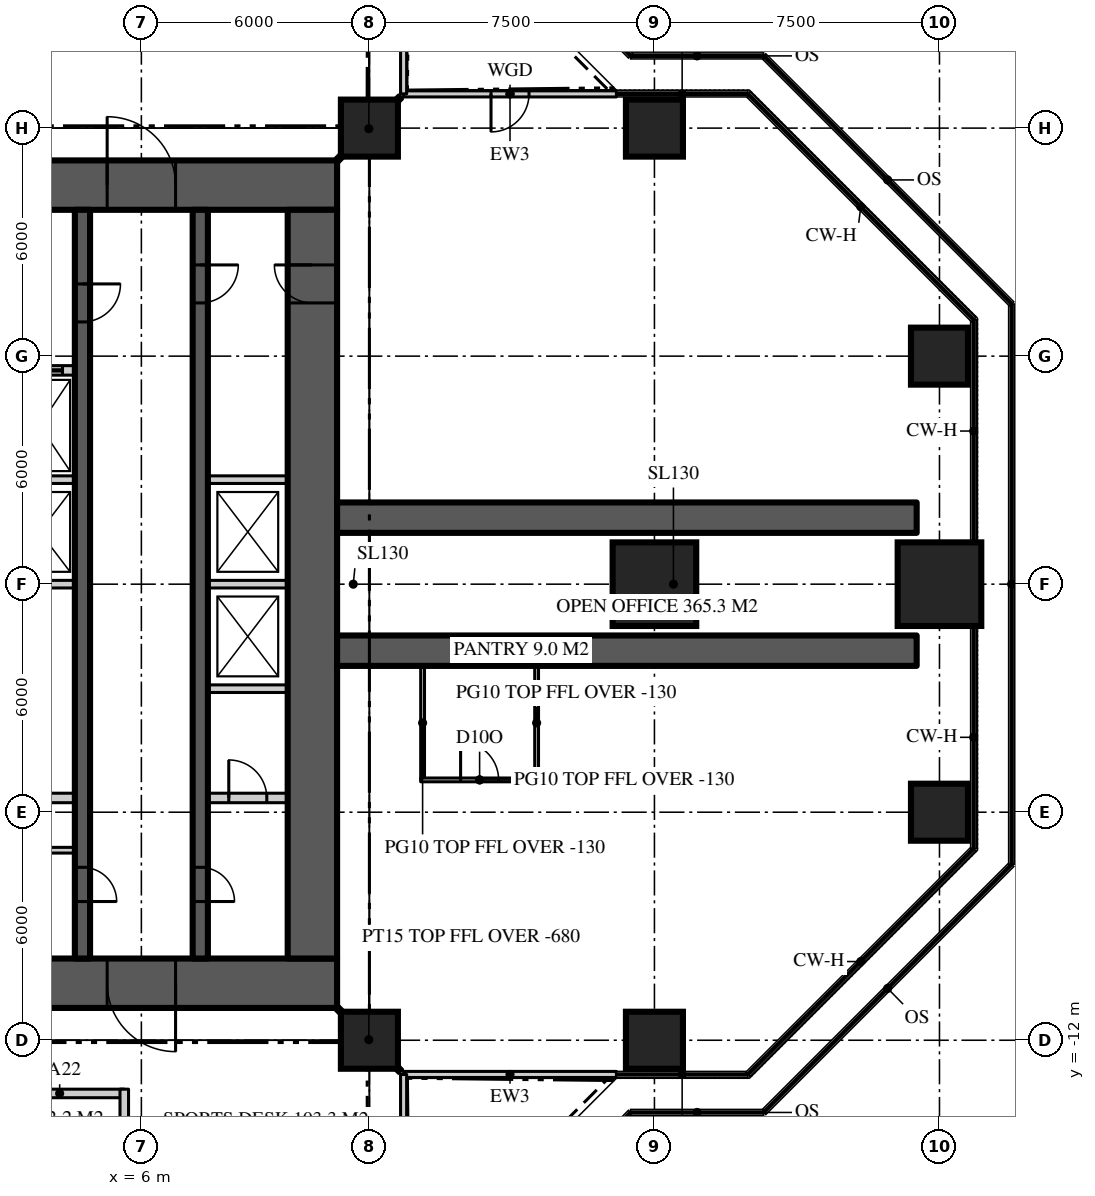
"""IFC4 building model, lengths in metres.
Left out: names, types, materials, properties, quantities, classifications, styles, units other than length and angle.
Written with IfcOpenShell. Run it as: python <this file> out.ifc"""

import sys

from ifc_helpers import new_model, si_unit, direction, frame, frame_2d, origin, origin_2d, place, context, subcontext, project, spatial, rectangle, extrude, element, fill, save


model = new_model("IFC4")
c1 = context("Model", 3, precision=1e-05, world=origin(), true_north=direction((0.0, 1.0)))
c2 = subcontext(c1, "Body", "Model", "MODEL_VIEW")
j1 = project(units=[si_unit("LENGTHUNIT", "METRE"), si_unit("PLANEANGLEUNIT", "RADIAN")], contexts=[c1])
p1 = place(None, origin())
s1 = spatial("IfcSite", under=j1, at=p1, CompositionType="ELEMENT")
p2 = place(p1, origin())
s2 = spatial("IfcBuilding", under=s1, at=p2, CompositionType="ELEMENT")
p3 = place(p2, frame((0.0, 0.0, 216.6)))
s3 = spatial("IfcBuildingStorey", under=s2, at=p3, CompositionType="ELEMENT", Elevation=216.6)
p4 = place(p3, frame((-11.15, 10.5, 0.0), z_axis=(0.0, 0.0, 1.0), x_axis=(1.0, 0.0, 0.0)))
e1 = element("IfcWall", 1, at=p4, inside=s3, PredefinedType="SHEAR", context=c2, shape_type="SweptSolid", body=[
    extrude(rectangle(XDim=22.3, YDim=1.3, at=frame_2d((11.15, 0.0))), origin(), (0.0, 0.0, 1.0), 3.9),
])
p5 = place(p4, frame((4.25, 0.0, 0.0)))
e2 = element("IfcOpeningElement", 2, at=p5, cuts=e1, PredefinedType="OPENING", context=c2, shape_type="SweptSolid", body=[
    extrude(rectangle(XDim=1.8, YDim=2.2, at=frame_2d((0.9, 1.1))), frame((0.0, 0.66, 0.0), z_axis=(0.0, -1.0, 0.0), x_axis=(1.0, 0.0, 0.0)), (0.0, 0.0, 1.0), 1.32),
])
p6 = place(p4, frame((16.25, 0.0, 0.0)))
e3 = element("IfcOpeningElement", 3, at=p6, cuts=e1, PredefinedType="OPENING", context=c2, shape_type="SweptSolid", body=[
    extrude(rectangle(XDim=1.8, YDim=2.2, at=frame_2d((0.9, 1.1))), frame((0.0, 0.66, 0.0), z_axis=(0.0, -1.0, 0.0), x_axis=(1.0, 0.0, 0.0)), (0.0, 0.0, 1.0), 1.32),
])
p7 = place(p3, frame((11.15, -10.5, 0.0), z_axis=(0.0, 0.0, 1.0), x_axis=(-1.0, 0.0, 0.0)))
e4 = element("IfcWall", 4, at=p7, inside=s3, PredefinedType="SHEAR", context=c2, shape_type="SweptSolid", body=[
    extrude(rectangle(XDim=22.3, YDim=1.3, at=frame_2d((11.15, 0.0))), origin(), (0.0, 0.0, 1.0), 3.9),
])
p8 = place(p7, frame((16.25, 0.0, 0.0)))
e5 = element("IfcOpeningElement", 5, at=p8, cuts=e4, PredefinedType="OPENING", context=c2, shape_type="SweptSolid", body=[
    extrude(rectangle(XDim=1.8, YDim=2.2, at=frame_2d((0.9, 1.1))), frame((0.0, 0.66, 0.0), z_axis=(0.0, -1.0, 0.0), x_axis=(1.0, 0.0, 0.0)), (0.0, 0.0, 1.0), 1.32),
])
p9 = place(p7, frame((4.25, 0.0, 0.0)))
e6 = element("IfcOpeningElement", 6, at=p9, cuts=e4, PredefinedType="OPENING", context=c2, shape_type="SweptSolid", body=[
    extrude(rectangle(XDim=1.8, YDim=2.2, at=frame_2d((0.9, 1.1))), frame((0.0, 0.66, 0.0), z_axis=(0.0, -1.0, 0.0), x_axis=(1.0, 0.0, 0.0)), (0.0, 0.0, 1.0), 1.32),
])
p10 = place(p3, frame((10.5, -9.85, 0.0), z_axis=(0.0, 0.0, 1.0), x_axis=(0.0, 1.0, 0.0)))
e7 = element("IfcWall", 7, at=p10, inside=s3, PredefinedType="SHEAR", context=c2, shape_type="SweptSolid", body=[
    extrude(rectangle(XDim=19.7, YDim=1.3, at=frame_2d((9.85, 0.0))), origin(), (0.0, 0.0, 1.0), 3.9),
])
p11 = place(p10, frame((17.25, 0.0, 0.0)))
e8 = element("IfcOpeningElement", 8, at=p11, cuts=e7, PredefinedType="OPENING", context=c2, shape_type="SweptSolid", body=[
    extrude(rectangle(XDim=1.0, YDim=2.2, at=frame_2d((0.5, 1.1))), frame((0.0, 0.66, 0.0), z_axis=(0.0, -1.0, 0.0), x_axis=(1.0, 0.0, 0.0)), (0.0, 0.0, 1.0), 1.32),
])
for number, where, z_axis, x_axis in (
    (9, (11.15, -1.75, 0.0), (0.0, 0.0, 1.0), (1.0, 0.0, 0.0)),
    (10, (11.15, 1.75, 0.0), (0.0, 0.0, 1.0), (1.0, 0.0, 0.0)),
):
    element("IfcWall", number, at=place(p3, frame(where, z_axis=z_axis, x_axis=x_axis)), inside=s3, PredefinedType="SHEAR", context=c2, shape_type="SweptSolid", body=[
        extrude(rectangle(XDim=15.25, YDim=0.8, at=frame_2d((7.625, 0.0))), origin(), (0.0, 0.0, 1.0), 3.9),
    ])
for number, where, z_axis, x_axis in (
    (11, (12.0, -12.0, 0.0), (0.0, 0.0, 1.0), (1.0, 0.0, 0.0)),
    (12, (19.5, -12.0, 0.0), (0.0, 0.0, 1.0), (1.0, 0.0, 0.0)),
    (13, (27.0, -6.0, 0.0), (0.0, 0.0, 1.0), (1.0, 0.0, 0.0)),
):
    element("IfcColumn", number, at=place(p3, frame(where, z_axis=z_axis, x_axis=x_axis)), inside=s3, PredefinedType="COLUMN", context=c2, shape_type="SweptSolid", body=[
        extrude(rectangle(XDim=1.5, YDim=1.5, at=origin_2d()), origin(), (0.0, 0.0, 1.0), 3.9),
    ])
for number, where, z_axis, x_axis in (
    (14, (19.5, 0.0, 0.0), (0.0, 0.0, 1.0), (1.0, 0.0, 0.0)),
    (15, (27.0, 0.0, 0.0), (0.0, 0.0, 1.0), (1.0, 0.0, 0.0)),
):
    element("IfcColumn", number, at=place(p3, frame(where, z_axis=z_axis, x_axis=x_axis)), inside=s3, PredefinedType="COLUMN", context=c2, shape_type="SweptSolid", body=[
        extrude(rectangle(XDim=2.2, YDim=2.2, at=origin_2d()), origin(), (0.0, 0.0, 1.0), 3.9),
    ])
for number, where, z_axis, x_axis in (
    (16, (27.0, 6.0, 0.0), (0.0, 0.0, 1.0), (1.0, 0.0, 0.0)),
    (17, (12.0, 12.0, 0.0), (0.0, 0.0, 1.0), (1.0, 0.0, 0.0)),
    (18, (19.5, 12.0, 0.0), (0.0, 0.0, 1.0), (1.0, 0.0, 0.0)),
):
    element("IfcColumn", number, at=place(p3, frame(where, z_axis=z_axis, x_axis=x_axis)), inside=s3, PredefinedType="COLUMN", context=c2, shape_type="SweptSolid", body=[
        extrude(rectangle(XDim=1.5, YDim=1.5, at=origin_2d()), origin(), (0.0, 0.0, 1.0), 3.9),
    ])
p12 = place(p3, frame((12.9, -12.9, 0.0), z_axis=(0.0, 0.0, 1.0), x_axis=(1.0, 0.0, 0.0)))
e19 = element("IfcWall", 19, at=p12, inside=s3, PredefinedType="SOLIDWALL", context=c2, shape_type="SweptSolid", body=[
    extrude(rectangle(XDim=5.6, YDim=0.16, at=frame_2d((2.8, 0.0))), origin(), (0.0, 0.0, 1.0), 3.77),
])
p13 = place(p3, frame((18.5, 12.9, 0.0), z_axis=(0.0, 0.0, 1.0), x_axis=(-1.0, 0.0, 0.0)))
e20 = element("IfcWall", 20, at=p13, inside=s3, PredefinedType="SOLIDWALL", context=c2, shape_type="SweptSolid", body=[
    extrude(rectangle(XDim=5.6, YDim=0.16, at=frame_2d((2.8, 0.0))), origin(), (0.0, 0.0, 1.0), 3.77),
])
p14 = place(p13, frame((2.3, 0.0, 0.0)))
e21 = element("IfcOpeningElement", 21, at=p14, cuts=e20, PredefinedType="OPENING", context=c2, shape_type="SweptSolid", body=[
    extrude(rectangle(XDim=1.0, YDim=2.2, at=frame_2d((0.5, 1.1))), frame((0.0, 0.09, 0.0), z_axis=(0.0, -1.0, 0.0), x_axis=(1.0, 0.0, 0.0)), (0.0, 0.0, 1.0), 0.18),
])
p15 = place(p3, frame((12.9, 12.9, 0.0), z_axis=(0.0, 0.0, 1.0), x_axis=(0.0, 1.0, 0.0)))
e22 = element("IfcWall", 22, at=p15, inside=s3, PredefinedType="SOLIDWALL", context=c2, shape_type="SweptSolid", body=[
    extrude(rectangle(XDim=5.6, YDim=0.16, at=frame_2d((2.8, 0.0))), origin(), (0.0, 0.0, 1.0), 3.77),
])
p16 = place(p3, frame((12.9, -18.5, 0.0), z_axis=(0.0, 0.0, 1.0), x_axis=(0.0, 1.0, 0.0)))
e23 = element("IfcWall", 23, at=p16, inside=s3, PredefinedType="SOLIDWALL", context=c2, shape_type="SweptSolid", body=[
    extrude(rectangle(XDim=5.6, YDim=0.16, at=frame_2d((2.8, 0.0))), origin(), (0.0, 0.0, 1.0), 3.77),
])
p17 = place(p16, frame((2.3, 0.0, 0.0)))
e24 = element("IfcOpeningElement", 24, at=p17, cuts=e23, PredefinedType="OPENING", context=c2, shape_type="SweptSolid", body=[
    extrude(rectangle(XDim=1.0, YDim=2.2, at=frame_2d((0.5, 1.1))), frame((0.0, 0.09, 0.0), z_axis=(0.0, -1.0, 0.0), x_axis=(1.0, 0.0, 0.0)), (0.0, 0.0, 1.0), 0.18),
])
p18 = place(p3, frame((7.55, 9.85, 0.0), z_axis=(0.0, 0.0, 1.0), x_axis=(0.0, -1.0, 0.0)))
e25 = element("IfcWall", 25, at=p18, inside=s3, PredefinedType="SHEAR", context=c2, shape_type="SweptSolid", body=[
    extrude(rectangle(XDim=19.7, YDim=0.4, at=frame_2d((9.85, 0.0))), origin(), (0.0, 0.0, 1.0), 3.9),
])
p19 = place(p18, frame((1.45, 0.0, 0.0)))
e26 = element("IfcOpeningElement", 26, at=p19, cuts=e25, PredefinedType="OPENING", context=c2, shape_type="SweptSolid", body=[
    extrude(rectangle(XDim=1.0, YDim=2.2, at=frame_2d((0.5, 1.1))), frame((0.0, 0.21, 0.0), z_axis=(0.0, -1.0, 0.0), x_axis=(1.0, 0.0, 0.0)), (0.0, 0.0, 1.0), 0.42),
])
p20 = place(p18, frame((17.3, 0.0, 0.0)))
e27 = element("IfcOpeningElement", 27, at=p20, cuts=e25, PredefinedType="OPENING", context=c2, shape_type="SweptSolid", body=[
    extrude(rectangle(XDim=0.9, YDim=2.1, at=frame_2d((0.45, 1.05))), frame((0.0, 0.21, 0.0), z_axis=(0.0, -1.0, 0.0), x_axis=(1.0, 0.0, 0.0)), (0.0, 0.0, 1.0), 0.42),
])
p21 = place(p3, frame((4.45, 9.85, 0.0), z_axis=(0.0, 0.0, 1.0), x_axis=(0.0, -1.0, 0.0)))
e28 = element("IfcWall", 28, at=p21, inside=s3, PredefinedType="SHEAR", context=c2, shape_type="SweptSolid", body=[
    extrude(rectangle(XDim=19.7, YDim=0.4, at=frame_2d((9.85, 0.0))), origin(), (0.0, 0.0, 1.0), 3.9),
])
p22 = place(p21, frame((1.95, 0.0, 0.0)))
e29 = element("IfcOpeningElement", 29, at=p22, cuts=e28, PredefinedType="OPENING", context=c2, shape_type="SweptSolid", body=[
    extrude(rectangle(XDim=1.0, YDim=2.2, at=frame_2d((0.5, 1.1))), frame((0.0, 0.21, 0.0), z_axis=(0.0, -1.0, 0.0), x_axis=(1.0, 0.0, 0.0)), (0.0, 0.0, 1.0), 0.42),
])
p23 = place(p21, frame((17.3, 0.0, 0.0)))
e30 = element("IfcOpeningElement", 30, at=p23, cuts=e28, PredefinedType="OPENING", context=c2, shape_type="SweptSolid", body=[
    extrude(rectangle(XDim=0.9, YDim=2.1, at=frame_2d((0.45, 1.05))), frame((0.0, 0.21, 0.0), z_axis=(0.0, -1.0, 0.0), x_axis=(1.0, 0.0, 0.0)), (0.0, 0.0, 1.0), 0.42),
])
p24 = place(p3, frame((2.4, 5.625, 0.0), z_axis=(0.0, 0.0, 1.0), x_axis=(1.0, 0.0, 0.0)))
e31 = element("IfcWall", 31, at=p24, inside=s3, PredefinedType="SOLIDWALL", context=c2, shape_type="SweptSolid", body=[
    extrude(rectangle(XDim=1.85, YDim=0.25, at=frame_2d((0.925, 0.0))), origin(), (0.0, 0.0, 1.0), 3.7),
])
p25 = place(p24, frame((0.325, 0.0, 0.0)))
e32 = element("IfcOpeningElement", 32, at=p25, cuts=e31, PredefinedType="OPENING", context=c2, shape_type="SweptSolid", body=[
    extrude(rectangle(XDim=1.2, YDim=2.2, at=frame_2d((0.6, 1.1))), frame((0.0, 0.135, 0.0), z_axis=(0.0, -1.0, 0.0), x_axis=(1.0, 0.0, 0.0)), (0.0, 0.0, 1.0), 0.27),
])
p26 = place(p3, frame((2.4, -5.625, 0.0), z_axis=(0.0, 0.0, 1.0), x_axis=(1.0, 0.0, 0.0)))
e33 = element("IfcWall", 33, at=p26, inside=s3, PredefinedType="SOLIDWALL", context=c2, shape_type="SweptSolid", body=[
    extrude(rectangle(XDim=1.85, YDim=0.25, at=frame_2d((0.925, 0.0))), origin(), (0.0, 0.0, 1.0), 3.7),
])
p27 = place(p3, frame((7.75, -5.625, 0.0), z_axis=(0.0, 0.0, 1.0), x_axis=(1.0, 0.0, 0.0)))
e34 = element("IfcWall", 34, at=p27, inside=s3, PredefinedType="SOLIDWALL", context=c2, shape_type="SweptSolid", body=[
    extrude(rectangle(XDim=2.1, YDim=0.25, at=frame_2d((1.05, 0.0))), origin(), (0.0, 0.0, 1.0), 3.7),
])
p28 = place(p27, frame((0.55, 0.0, 0.0)))
e35 = element("IfcOpeningElement", 35, at=p28, cuts=e34, PredefinedType="OPENING", context=c2, shape_type="SweptSolid", body=[
    extrude(rectangle(XDim=1.0, YDim=2.2, at=frame_2d((0.5, 1.1))), frame((0.0, 0.135, 0.0), z_axis=(0.0, -1.0, 0.0), x_axis=(1.0, 0.0, 0.0)), (0.0, 0.0, 1.0), 0.27),
])
p29 = place(p3, frame((7.75, -2.75, 0.0), z_axis=(0.0, 0.0, 1.0), x_axis=(1.0, 0.0, 0.0)))
e36 = element("IfcWall", 36, at=p29, inside=s3, PredefinedType="SOLIDWALL", context=c2, shape_type="SweptSolid", body=[
    extrude(rectangle(XDim=2.1, YDim=0.2, at=frame_2d((1.05, 0.0))), origin(), (0.0, 0.0, 1.0), 3.7),
])
p30 = place(p3, frame((2.4, 0.0, 0.0), z_axis=(0.0, 0.0, 1.0), x_axis=(1.0, 0.0, 0.0)))
e37 = element("IfcWall", 37, at=p30, inside=s3, PredefinedType="SOLIDWALL", context=c2, shape_type="SweptSolid", body=[
    extrude(rectangle(XDim=1.85, YDim=0.2, at=frame_2d((0.925, 0.0))), origin(), (0.0, 0.0, 1.0), 3.7),
])
p31 = place(p3, frame((7.75, 0.0, 0.0), z_axis=(0.0, 0.0, 1.0), x_axis=(1.0, 0.0, 0.0)))
e38 = element("IfcWall", 38, at=p31, inside=s3, PredefinedType="SOLIDWALL", context=c2, shape_type="SweptSolid", body=[
    extrude(rectangle(XDim=2.1, YDim=0.2, at=frame_2d((1.05, 0.0))), origin(), (0.0, 0.0, 1.0), 3.7),
])
p32 = place(p3, frame((2.4, 2.75, 0.0), z_axis=(0.0, 0.0, 1.0), x_axis=(1.0, 0.0, 0.0)))
e39 = element("IfcWall", 39, at=p32, inside=s3, PredefinedType="SOLIDWALL", context=c2, shape_type="SweptSolid", body=[
    extrude(rectangle(XDim=1.85, YDim=0.2, at=frame_2d((0.925, 0.0))), origin(), (0.0, 0.0, 1.0), 3.7),
])
p33 = place(p3, frame((7.75, 2.75, 0.0), z_axis=(0.0, 0.0, 1.0), x_axis=(1.0, 0.0, 0.0)))
e40 = element("IfcWall", 40, at=p33, inside=s3, PredefinedType="SOLIDWALL", context=c2, shape_type="SweptSolid", body=[
    extrude(rectangle(XDim=2.1, YDim=0.2, at=frame_2d((1.05, 0.0))), origin(), (0.0, 0.0, 1.0), 3.7),
])
for number, where, z_axis, x_axis in (
    (41, (13.4, -2.15, 0.0), (0.0, 0.0, 1.0), (0.0, -1.0, 0.0)),
    (42, (16.4, -2.15, 0.0), (0.0, 0.0, 1.0), (0.0, -1.0, 0.0)),
):
    element("IfcWall", number, at=place(p3, frame(where, z_axis=z_axis, x_axis=x_axis)), inside=s3, PredefinedType="PARTITIONING", context=c2, shape_type="SweptSolid", body=[
        extrude(rectangle(XDim=3.0, YDim=0.1, at=frame_2d((1.5, 0.0))), origin(), (0.0, 0.0, 1.0), 3.77),
    ])
p34 = place(p3, frame((13.35, -5.15, 0.0), z_axis=(0.0, 0.0, 1.0), x_axis=(1.0, 0.0, 0.0)))
e43 = element("IfcWall", 43, at=p34, inside=s3, PredefinedType="PARTITIONING", context=c2, shape_type="SweptSolid", body=[
    extrude(rectangle(XDim=3.1, YDim=0.1, at=frame_2d((1.55, 0.0))), origin(), (0.0, 0.0, 1.0), 3.77),
])
p35 = place(p34, frame((1.05, 0.0, 0.0)))
e44 = element("IfcOpeningElement", 44, at=p35, cuts=e43, PredefinedType="OPENING", context=c2, shape_type="SweptSolid", body=[
    extrude(rectangle(XDim=1.0, YDim=2.2, at=frame_2d((0.5, 1.1))), frame((0.0, 0.06, 0.0), z_axis=(0.0, -1.0, 0.0), x_axis=(1.0, 0.0, 0.0)), (0.0, 0.0, 1.0), 0.12),
])
p36 = place(p3, frame((2.15, -13.4, 0.0), z_axis=(0.0, 0.0, 1.0), x_axis=(1.0, 0.0, 0.0)))
e45 = element("IfcWall", 45, at=p36, inside=s3, PredefinedType="PARTITIONING", context=c2, shape_type="SweptSolid", body=[
    extrude(rectangle(XDim=3.4, YDim=0.225, at=frame_2d((1.7, 0.0))), origin(), (0.0, 0.0, 1.0), 3.77),
])
p37 = place(p3, frame((5.55, -13.288, 0.0), z_axis=(0.0, 0.0, 1.0), x_axis=(0.0, -1.0, 0.0)))
e46 = element("IfcWall", 46, at=p37, inside=s3, PredefinedType="PARTITIONING", context=c2, shape_type="SweptSolid", body=[
    extrude(rectangle(XDim=3.825, YDim=0.225, at=frame_2d((1.913, 0.0))), origin(), (0.0, 0.0, 1.0), 3.77),
])
p38 = place(p37, frame((1.312, 0.0, 0.0)))
e47 = element("IfcOpeningElement", 47, at=p38, cuts=e46, PredefinedType="OPENING", context=c2, shape_type="SweptSolid", body=[
    extrude(rectangle(XDim=1.2, YDim=2.2, at=frame_2d((0.6, 1.1))), frame((0.0, 0.123, 0.0), z_axis=(0.0, -1.0, 0.0), x_axis=(1.0, 0.0, 0.0)), (0.0, 0.0, 1.0), 0.245),
])
for number, where, z_axis, x_axis in (
    (48, (11.15, 11.15, 0.0), (0.0, 0.0, 1.0), (0.707, 0.707, 0.0)),
    (49, (11.15, -11.15, 0.0), (0.0, 0.0, 1.0), (0.707, -0.707, 0.0)),
):
    element("IfcWall", number, at=place(p3, frame(where, z_axis=z_axis, x_axis=x_axis)), inside=s3, PredefinedType="PARTITIONING", context=c2, shape_type="SweptSolid", body=[
        extrude(rectangle(XDim=2.362, YDim=0.15, at=frame_2d((1.181, 0.0))), origin(), (0.0, 0.0, 1.0), 3.22),
    ])
p39 = place(p3, frame((2.4, -7.0, 0.0), z_axis=(0.0, 0.0, 1.0), x_axis=(1.0, 0.0, 0.0)))
e50 = element("IfcWall", 50, at=p39, inside=s3, PredefinedType="SOLIDWALL", context=c2, shape_type="SweptSolid", body=[
    extrude(rectangle(XDim=1.85, YDim=0.15, at=frame_2d((0.925, 0.0))), origin(), (0.0, 0.0, 1.0), 3.77),
])
p40 = place(p39, frame((0.1, 0.0, 0.0)))
e51 = element("IfcOpeningElement", 51, at=p40, cuts=e50, PredefinedType="OPENING", context=c2, shape_type="SweptSolid", body=[
    extrude(rectangle(XDim=0.9, YDim=2.1, at=frame_2d((0.45, 1.05))), frame((0.0, 0.085, 0.0), z_axis=(0.0, -1.0, 0.0), x_axis=(1.0, 0.0, 0.0)), (0.0, 0.0, 1.0), 0.17),
])
p41 = place(p14, origin())
e52 = element("IfcDoor", 52, at=p41, inside=s3, OperationType="SINGLE_SWING_RIGHT", PredefinedType="DOOR", context=c2, shape_type="SweptSolid", body=[
    extrude(rectangle(XDim=1.0, YDim=2.2, at=frame_2d((0.5, 1.1))), frame((0.0, 0.025, 0.0), z_axis=(0.0, -1.0, 0.0), x_axis=(1.0, 0.0, 0.0)), (0.0, 0.0, 1.0), 0.05),
])
fill(e21, e52)
p42 = place(p6, origin())
e53 = element("IfcDoor", 53, at=p42, inside=s3, OperationType="DOUBLE_DOOR_DOUBLE_SWING", PredefinedType="DOOR", context=c2, shape_type="SweptSolid", body=[
    extrude(rectangle(XDim=1.8, YDim=2.2, at=frame_2d((0.9, 1.1))), frame((0.0, 0.025, 0.0), z_axis=(0.0, -1.0, 0.0), x_axis=(1.0, 0.0, 0.0)), (0.0, 0.0, 1.0), 0.05),
])
fill(e3, e53)
p43 = place(p9, origin())
e54 = element("IfcDoor", 54, at=p43, inside=s3, OperationType="DOUBLE_DOOR_DOUBLE_SWING", PredefinedType="DOOR", context=c2, shape_type="SweptSolid", body=[
    extrude(rectangle(XDim=1.8, YDim=2.2, at=frame_2d((0.9, 1.1))), frame((0.0, 0.025, 0.0), z_axis=(0.0, -1.0, 0.0), x_axis=(1.0, 0.0, 0.0)), (0.0, 0.0, 1.0), 0.05),
])
fill(e6, e54)
p44 = place(p19, origin())
e55 = element("IfcDoor", 55, at=p44, inside=s3, OperationType="SINGLE_SWING_LEFT", PredefinedType="DOOR", context=c2, shape_type="SweptSolid", body=[
    extrude(rectangle(XDim=1.0, YDim=2.2, at=frame_2d((0.5, 1.1))), frame((0.0, 0.025, 0.0), z_axis=(0.0, -1.0, 0.0), x_axis=(1.0, 0.0, 0.0)), (0.0, 0.0, 1.0), 0.05),
])
fill(e26, e55)
p45 = place(p11, origin())
e56 = element("IfcDoor", 56, at=p45, inside=s3, OperationType="SINGLE_SWING_RIGHT", PredefinedType="DOOR", context=c2, shape_type="SweptSolid", body=[
    extrude(rectangle(XDim=1.0, YDim=2.2, at=frame_2d((0.5, 1.1))), frame((0.0, 0.025, 0.0), z_axis=(0.0, -1.0, 0.0), x_axis=(1.0, 0.0, 0.0)), (0.0, 0.0, 1.0), 0.05),
])
fill(e8, e56)
p46 = place(p22, origin())
e57 = element("IfcDoor", 57, at=p46, inside=s3, OperationType="SINGLE_SWING_LEFT", PredefinedType="DOOR", context=c2, shape_type="SweptSolid", body=[
    extrude(rectangle(XDim=1.0, YDim=2.2, at=frame_2d((0.5, 1.1))), frame((0.0, 0.025, 0.0), z_axis=(0.0, -1.0, 0.0), x_axis=(1.0, 0.0, 0.0)), (0.0, 0.0, 1.0), 0.05),
])
fill(e29, e57)
p47 = place(p20, origin())
e58 = element("IfcDoor", 58, at=p47, inside=s3, OperationType="SINGLE_SWING_RIGHT", PredefinedType="DOOR", context=c2, shape_type="SweptSolid", body=[
    extrude(rectangle(XDim=0.9, YDim=2.1, at=frame_2d((0.45, 1.05))), frame((0.0, 0.025, 0.0), z_axis=(0.0, -1.0, 0.0), x_axis=(1.0, 0.0, 0.0)), (0.0, 0.0, 1.0), 0.05),
])
fill(e27, e58)
p48 = place(p23, origin())
e59 = element("IfcDoor", 59, at=p48, inside=s3, OperationType="SINGLE_SWING_RIGHT", PredefinedType="DOOR", context=c2, shape_type="SweptSolid", body=[
    extrude(rectangle(XDim=0.9, YDim=2.1, at=frame_2d((0.45, 1.05))), frame((0.0, 0.025, 0.0), z_axis=(0.0, -1.0, 0.0), x_axis=(1.0, 0.0, 0.0)), (0.0, 0.0, 1.0), 0.05),
])
fill(e30, e59)
p49 = place(p25, origin())
e60 = element("IfcDoor", 60, at=p49, inside=s3, OperationType="SLIDING_TO_LEFT", PredefinedType="DOOR", context=c2, shape_type="SweptSolid", body=[
    extrude(rectangle(XDim=1.2, YDim=2.2, at=frame_2d((0.6, 1.1))), frame((0.0, 0.025, 0.0), z_axis=(0.0, -1.0, 0.0), x_axis=(1.0, 0.0, 0.0)), (0.0, 0.0, 1.0), 0.05),
])
fill(e32, e60)
p50 = place(p35, origin())
e61 = element("IfcDoor", 61, at=p50, inside=s3, OperationType="SINGLE_SWING_LEFT", PredefinedType="DOOR", context=c2, shape_type="SweptSolid", body=[
    extrude(rectangle(XDim=1.0, YDim=2.2, at=frame_2d((0.5, 1.1))), frame((0.0, 0.025, 0.0), z_axis=(0.0, -1.0, 0.0), x_axis=(1.0, 0.0, 0.0)), (0.0, 0.0, 1.0), 0.05),
])
fill(e44, e61)
p51 = place(p28, origin())
e62 = element("IfcDoor", 62, at=p51, inside=s3, OperationType="SINGLE_SWING_LEFT", PredefinedType="DOOR", context=c2, shape_type="SweptSolid", body=[
    extrude(rectangle(XDim=1.0, YDim=2.2, at=frame_2d((0.5, 1.1))), frame((0.0, 0.025, 0.0), z_axis=(0.0, -1.0, 0.0), x_axis=(1.0, 0.0, 0.0)), (0.0, 0.0, 1.0), 0.05),
])
fill(e35, e62)
save(model, sys.argv[1])
